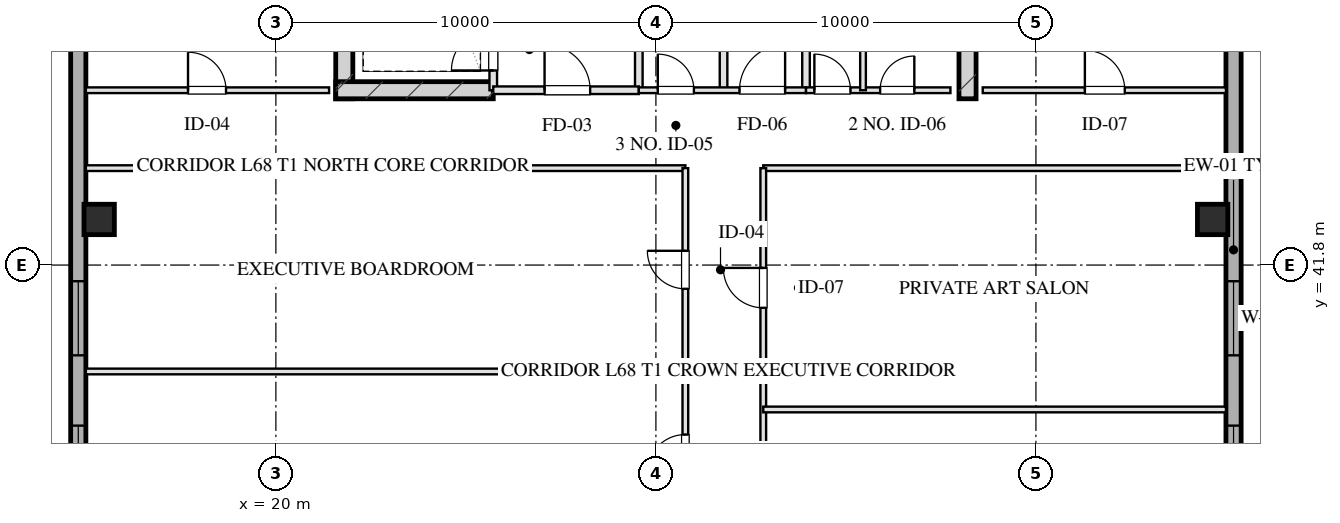
"""IFC4 building model, lengths in metres.
Left out: names, types, materials, properties, quantities, classifications, styles, units other than length and angle.
Written with IfcOpenShell. Run it as: python <this file> out.ifc"""

import sys

from ifc_helpers import new_model, si_unit, direction, frame, frame_2d, origin, origin_2d, place, context, subcontext, project, spatial, rectangle, hollow_rectangle, extrude, element, fill, save


model = new_model("IFC4")
c1 = context("Model", 3, precision=1e-05, world=origin(), true_north=direction((0.0, 1.0)))
c2 = subcontext(c1, "Body", "Model", "MODEL_VIEW")
j1 = project(units=[si_unit("LENGTHUNIT", "METRE"), si_unit("PLANEANGLEUNIT", "RADIAN")], contexts=[c1])
p1 = place(None, origin())
s1 = spatial("IfcSite", under=j1, at=p1, CompositionType="ELEMENT")
p2 = place(p1, origin())
s2 = spatial("IfcBuilding", under=s1, at=p2, CompositionType="ELEMENT")
p3 = place(p2, frame((0.0, 0.0, 250.4)))
s3 = spatial("IfcBuildingStorey", under=s2, at=p3, CompositionType="ELEMENT", Elevation=250.4)
for number, where, z_axis, x_axis in (
    (1, (21.8, 46.175, 0.0), (0.0, 0.0, 1.0), (0.0, 1.0, 0.0)),
    (2, (38.2, 46.175, 0.0), (0.0, 0.0, 1.0), (0.0, 1.0, 0.0)),
):
    element("IfcWall", number, at=place(p3, frame(where, z_axis=z_axis, x_axis=x_axis)), inside=s3, PredefinedType="SHEAR", context=c2, shape_type="SweptSolid", body=[
        extrude(rectangle(XDim=9.33, YDim=0.45, at=frame_2d((4.665, 0.0))), origin(), (0.0, 0.0, 1.0), 3.2),
    ])
p4 = place(p3, frame((21.575, 46.4, 0.0), z_axis=(0.0, 0.0, 1.0), x_axis=(1.0, 0.0, 0.0)))
e3 = element("IfcWall", 3, at=p4, inside=s3, PredefinedType="SHEAR", context=c2, shape_type="SweptSolid", body=[
    extrude(rectangle(XDim=4.145, YDim=0.45, at=frame_2d((2.073, 0.0))), origin(), (0.0, 0.0, 1.0), 3.2),
])
for number, where, z_axis, x_axis in (
    (4, (15.35, 43.0, 0.0), (0.0, 0.0, 1.0), (1.0, 0.0, 0.0)),
    (5, (44.65, 43.0, 0.0), (0.0, 0.0, 1.0), (1.0, 0.0, 0.0)),
):
    element("IfcColumn", number, at=place(p3, frame(where, z_axis=z_axis, x_axis=x_axis)), inside=s3, PredefinedType="COLUMN", context=c2, shape_type="SweptSolid", body=[
        extrude(hollow_rectangle(XDim=0.8, YDim=0.8, WallThickness=0.028, at=origin_2d()), origin(), (0.0, 0.0, 1.0), 3.201),
    ])
p5 = place(p3, frame((14.8, 13.1, 0.0), z_axis=(0.0, 0.0, 1.0), x_axis=(0.0, 1.0, 0.0)))
e6 = element("IfcWall", 6, at=p5, inside=s3, PredefinedType="SOLIDWALL", context=c2, shape_type="SweptSolid", body=[
    extrude(rectangle(XDim=41.8, YDim=0.4, at=frame_2d((20.9, 0.0))), origin(), (0.0, 0.0, 1.0), 2.36),
])
p6 = place(p5, frame((22.525, 0.0, 0.75)))
e7 = element("IfcOpeningElement", 7, at=p6, cuts=e6, PredefinedType="OPENING", context=c2, shape_type="SweptSolid", body=[
    extrude(rectangle(XDim=1.95, YDim=1.21, at=frame_2d((0.975, 0.605))), frame((0.0, 0.21, 0.0), z_axis=(0.0, -1.0, 0.0), x_axis=(1.0, 0.0, 0.0)), (0.0, 0.0, 1.0), 0.42),
])
p7 = place(p5, frame((26.325, 0.0, 0.75)))
e8 = element("IfcOpeningElement", 8, at=p7, cuts=e6, PredefinedType="OPENING", context=c2, shape_type="SweptSolid", body=[
    extrude(rectangle(XDim=1.95, YDim=1.21, at=frame_2d((0.975, 0.605))), frame((0.0, 0.21, 0.0), z_axis=(0.0, -1.0, 0.0), x_axis=(1.0, 0.0, 0.0)), (0.0, 0.0, 1.0), 0.42),
])
p8 = place(p5, frame((17.25, 0.0, 0.0)))
e9 = element("IfcOpeningElement", 9, at=p8, cuts=e6, PredefinedType="OPENING", context=c2, shape_type="SweptSolid", body=[
    extrude(rectangle(XDim=1.1, YDim=2.15, at=frame_2d((0.55, 1.075))), frame((0.0, 0.21, 0.0), z_axis=(0.0, -1.0, 0.0), x_axis=(1.0, 0.0, 0.0)), (0.0, 0.0, 1.0), 0.42),
])
p9 = place(p3, frame((45.2, 54.9, 0.0), z_axis=(0.0, 0.0, 1.0), x_axis=(0.0, -1.0, 0.0)))
e10 = element("IfcWall", 10, at=p9, inside=s3, PredefinedType="SOLIDWALL", context=c2, shape_type="SweptSolid", body=[
    extrude(rectangle(XDim=41.8, YDim=0.4, at=frame_2d((20.9, 0.0))), origin(), (0.0, 0.0, 1.0), 2.36),
])
p10 = place(p9, frame((17.325, 0.0, 0.75)))
e11 = element("IfcOpeningElement", 11, at=p10, cuts=e10, PredefinedType="OPENING", context=c2, shape_type="SweptSolid", body=[
    extrude(rectangle(XDim=1.95, YDim=1.21, at=frame_2d((0.975, 0.605))), frame((0.0, 0.21, 0.0), z_axis=(0.0, -1.0, 0.0), x_axis=(1.0, 0.0, 0.0)), (0.0, 0.0, 1.0), 0.42),
])
p11 = place(p9, frame((13.525, 0.0, 0.75)))
e12 = element("IfcOpeningElement", 12, at=p11, cuts=e10, PredefinedType="OPENING", context=c2, shape_type="SweptSolid", body=[
    extrude(rectangle(XDim=1.95, YDim=1.21, at=frame_2d((0.975, 0.605))), frame((0.0, 0.21, 0.0), z_axis=(0.0, -1.0, 0.0), x_axis=(1.0, 0.0, 0.0)), (0.0, 0.0, 1.0), 0.42),
])
p12 = place(p9, frame((26.15, 0.0, 0.0)))
e13 = element("IfcOpeningElement", 13, at=p12, cuts=e10, PredefinedType="OPENING", context=c2, shape_type="SweptSolid", body=[
    extrude(rectangle(XDim=1.1, YDim=2.15, at=frame_2d((0.55, 1.075))), frame((0.0, 0.21, 0.0), z_axis=(0.0, -1.0, 0.0), x_axis=(1.0, 0.0, 0.0)), (0.0, 0.0, 1.0), 0.42),
])
p13 = place(p3, frame((25.72, 46.4, 0.0), z_axis=(0.0, 0.0, 1.0), x_axis=(0.0, 1.0, 0.0)))
e14 = element("IfcWall", 14, at=p13, inside=s3, PredefinedType="PARTITIONING", context=c2, shape_type="SweptSolid", body=[
    extrude(rectangle(XDim=1.9, YDim=0.2, at=frame_2d((0.95, 0.0))), origin(), (0.0, 0.0, 1.0), 2.925),
])
p14 = place(p13, frame((0.52, 0.0, 0.0)))
e15 = element("IfcOpeningElement", 15, at=p14, cuts=e14, PredefinedType="OPENING", context=c2, shape_type="SweptSolid", body=[
    extrude(rectangle(XDim=1.1, YDim=2.05, at=frame_2d((0.55, 1.025))), frame((0.0, 0.11, 0.0), z_axis=(0.0, -1.0, 0.0), x_axis=(1.0, 0.0, 0.0)), (0.0, 0.0, 1.0), 0.22),
])
p15 = place(p3, frame((29.55, 46.4, 0.0), z_axis=(0.0, 0.0, 1.0), x_axis=(0.0, 1.0, 0.0)))
e16 = element("IfcWall", 16, at=p15, inside=s3, PredefinedType="PARTITIONING", context=c2, shape_type="SweptSolid", body=[
    extrude(rectangle(XDim=8.43, YDim=0.2, at=frame_2d((4.215, 0.0))), origin(), (0.0, 0.0, 1.0), 2.925),
])
p16 = place(p3, frame((25.72, 46.4, 0.0), z_axis=(0.0, 0.0, 1.0), x_axis=(1.0, 0.0, 0.0)))
e17 = element("IfcWall", 17, at=p16, inside=s3, PredefinedType="PARTITIONING", context=c2, shape_type="SweptSolid", body=[
    extrude(rectangle(XDim=3.83, YDim=0.2, at=frame_2d((1.915, 0.0))), origin(), (0.0, 0.0, 1.0), 2.925),
])
p17 = place(p16, frame((1.35, 0.0, 0.0)))
e18 = element("IfcOpeningElement", 18, at=p17, cuts=e17, PredefinedType="OPENING", context=c2, shape_type="SweptSolid", body=[
    extrude(rectangle(XDim=1.2, YDim=2.05, at=frame_2d((0.6, 1.025))), frame((0.0, 0.11, 0.0), z_axis=(0.0, -1.0, 0.0), x_axis=(1.0, 0.0, 0.0)), (0.0, 0.0, 1.0), 0.22),
])
for number, where, z_axis, x_axis in (
    (19, (33.95, 46.4, 0.0), (0.0, 0.0, 1.0), (0.0, 1.0, 0.0)),
    (20, (31.78, 46.4, 0.0), (0.0, 0.0, 1.0), (0.0, 1.0, 0.0)),
):
    element("IfcWall", number, at=place(p3, frame(where, z_axis=z_axis, x_axis=x_axis)), inside=s3, PredefinedType="PARTITIONING", context=c2, shape_type="SweptSolid", body=[
        extrude(rectangle(XDim=8.43, YDim=0.2, at=frame_2d((4.215, 0.0))), origin(), (0.0, 0.0, 1.0), 2.925),
    ])
p18 = place(p3, frame((29.55, 46.4, 0.0), z_axis=(0.0, 0.0, 1.0), x_axis=(1.0, 0.0, 0.0)))
e21 = element("IfcWall", 21, at=p18, inside=s3, PredefinedType="PARTITIONING", context=c2, shape_type="SweptSolid", body=[
    extrude(rectangle(XDim=4.4, YDim=0.15, at=frame_2d((2.2, 0.0))), origin(), (0.0, 0.0, 1.0), 2.925),
])
p19 = place(p18, frame((0.5, 0.0, 0.0)))
e22 = element("IfcOpeningElement", 22, at=p19, cuts=e21, PredefinedType="OPENING", context=c2, shape_type="SweptSolid", body=[
    extrude(rectangle(XDim=0.95, YDim=2.05, at=frame_2d((0.475, 1.025))), frame((0.0, 0.085, 0.0), z_axis=(0.0, -1.0, 0.0), x_axis=(1.0, 0.0, 0.0)), (0.0, 0.0, 1.0), 0.17),
])
p20 = place(p18, frame((2.65, 0.0, 0.0)))
e23 = element("IfcOpeningElement", 23, at=p20, cuts=e21, PredefinedType="OPENING", context=c2, shape_type="SweptSolid", body=[
    extrude(rectangle(XDim=1.2, YDim=2.05, at=frame_2d((0.6, 1.025))), frame((0.0, 0.085, 0.0), z_axis=(0.0, -1.0, 0.0), x_axis=(1.0, 0.0, 0.0)), (0.0, 0.0, 1.0), 0.17),
])
p21 = place(p3, frame((33.95, 46.4, 0.0), z_axis=(0.0, 0.0, 1.0), x_axis=(1.0, 0.0, 0.0)))
e24 = element("IfcWall", 24, at=p21, inside=s3, PredefinedType="PARTITIONING", context=c2, shape_type="SweptSolid", body=[
    extrude(rectangle(XDim=3.8, YDim=0.15, at=frame_2d((1.9, 0.0))), origin(), (0.0, 0.0, 1.0), 2.925),
])
p22 = place(p21, frame((0.22, 0.0, 0.0)))
e25 = element("IfcOpeningElement", 25, at=p22, cuts=e24, PredefinedType="OPENING", context=c2, shape_type="SweptSolid", body=[
    extrude(rectangle(XDim=0.95, YDim=2.05, at=frame_2d((0.475, 1.025))), frame((0.0, 0.085, 0.0), z_axis=(0.0, -1.0, 0.0), x_axis=(1.0, 0.0, 0.0)), (0.0, 0.0, 1.0), 0.17),
])
p23 = place(p21, frame((1.95, 0.0, 0.0)))
e26 = element("IfcOpeningElement", 26, at=p23, cuts=e24, PredefinedType="OPENING", context=c2, shape_type="SweptSolid", body=[
    extrude(rectangle(XDim=0.9, YDim=2.05, at=frame_2d((0.45, 1.025))), frame((0.0, 0.085, 0.0), z_axis=(0.0, -1.0, 0.0), x_axis=(1.0, 0.0, 0.0)), (0.0, 0.0, 1.0), 0.17),
])
p24 = place(p3, frame((35.45, 46.4, 0.0), z_axis=(0.0, 0.0, 1.0), x_axis=(0.0, 1.0, 0.0)))
e27 = element("IfcWall", 27, at=p24, inside=s3, PredefinedType="PARTITIONING", context=c2, shape_type="SweptSolid", body=[
    extrude(rectangle(XDim=8.43, YDim=0.15, at=frame_2d((4.215, 0.0))), origin(), (0.0, 0.0, 1.0), 2.515),
])
p25 = place(p24, frame((2.55, 0.0, 0.0)))
e28 = element("IfcOpeningElement", 28, at=p25, cuts=e27, PredefinedType="OPENING", context=c2, shape_type="SweptSolid", body=[
    extrude(rectangle(XDim=0.95, YDim=2.05, at=frame_2d((0.475, 1.025))), frame((0.0, 0.085, 0.0), z_axis=(0.0, -1.0, 0.0), x_axis=(1.0, 0.0, 0.0)), (0.0, 0.0, 1.0), 0.17),
])
p26 = place(p24, frame((5.6, 0.0, 0.0)))
e29 = element("IfcOpeningElement", 29, at=p26, cuts=e27, PredefinedType="OPENING", context=c2, shape_type="SweptSolid", body=[
    extrude(rectangle(XDim=0.9, YDim=2.05, at=frame_2d((0.45, 1.025))), frame((0.0, 0.085, 0.0), z_axis=(0.0, -1.0, 0.0), x_axis=(1.0, 0.0, 0.0)), (0.0, 0.0, 1.0), 0.17),
])
p27 = place(p3, frame((15.0, 46.4, 0.0), z_axis=(0.0, 0.0, 1.0), x_axis=(1.0, 0.0, 0.0)))
e30 = element("IfcWall", 30, at=p27, inside=s3, PredefinedType="PARTITIONING", context=c2, shape_type="SweptSolid", body=[
    extrude(rectangle(XDim=6.4, YDim=0.15, at=frame_2d((3.2, 0.0))), origin(), (0.0, 0.0, 1.0), 2.925),
])
p28 = place(p27, frame((2.688, 0.0, 0.0)))
e31 = element("IfcOpeningElement", 31, at=p28, cuts=e30, PredefinedType="OPENING", context=c2, shape_type="SweptSolid", body=[
    extrude(rectangle(XDim=1.0, YDim=2.05, at=frame_2d((0.5, 1.025))), frame((0.0, 0.085, 0.0), z_axis=(0.0, -1.0, 0.0), x_axis=(1.0, 0.0, 0.0)), (0.0, 0.0, 1.0), 0.17),
])
p29 = place(p3, frame((38.6, 46.4, 0.0), z_axis=(0.0, 0.0, 1.0), x_axis=(1.0, 0.0, 0.0)))
e32 = element("IfcWall", 32, at=p29, inside=s3, PredefinedType="PARTITIONING", context=c2, shape_type="SweptSolid", body=[
    extrude(rectangle(XDim=6.4, YDim=0.15, at=frame_2d((3.2, 0.0))), origin(), (0.0, 0.0, 1.0), 2.925),
])
p30 = place(p29, frame((2.688, 0.0, 0.0)))
e33 = element("IfcOpeningElement", 33, at=p30, cuts=e32, PredefinedType="OPENING", context=c2, shape_type="SweptSolid", body=[
    extrude(rectangle(XDim=1.05, YDim=2.05, at=frame_2d((0.525, 1.025))), frame((0.0, 0.085, 0.0), z_axis=(0.0, -1.0, 0.0), x_axis=(1.0, 0.0, 0.0)), (0.0, 0.0, 1.0), 0.17),
])
p31 = place(p3, frame((15.0, 44.35, 0.0), z_axis=(0.0, 0.0, 1.0), x_axis=(1.0, 0.0, 0.0)))
e34 = element("IfcWall", 34, at=p31, inside=s3, PredefinedType="PARTITIONING", context=c2, shape_type="SweptSolid", body=[
    extrude(rectangle(XDim=15.775, YDim=0.15, at=frame_2d((7.887, 0.0))), origin(), (0.0, 0.0, 1.0), 2.925),
])
p32 = place(p3, frame((32.825, 44.35, 0.0), z_axis=(0.0, 0.0, 1.0), x_axis=(1.0, 0.0, 0.0)))
e35 = element("IfcWall", 35, at=p32, inside=s3, PredefinedType="PARTITIONING", context=c2, shape_type="SweptSolid", body=[
    extrude(rectangle(XDim=12.175, YDim=0.15, at=frame_2d((6.087, 0.0))), origin(), (0.0, 0.0, 1.0), 2.925),
])
p33 = place(p3, frame((30.775, 23.65, 0.0), z_axis=(0.0, 0.0, 1.0), x_axis=(0.0, 1.0, 0.0)))
e36 = element("IfcWall", 36, at=p33, inside=s3, PredefinedType="PARTITIONING", context=c2, shape_type="SweptSolid", body=[
    extrude(rectangle(XDim=20.7, YDim=0.15, at=frame_2d((10.35, 0.0))), origin(), (0.0, 0.0, 1.0), 2.925),
])
p34 = place(p33, frame((2.175, 0.0, 0.0)))
e37 = element("IfcOpeningElement", 37, at=p34, cuts=e36, PredefinedType="OPENING", context=c2, shape_type="SweptSolid", body=[
    extrude(rectangle(XDim=1.0, YDim=2.05, at=frame_2d((0.5, 1.025))), frame((0.0, 0.085, 0.0), z_axis=(0.0, -1.0, 0.0), x_axis=(1.0, 0.0, 0.0)), (0.0, 0.0, 1.0), 0.17),
])
p35 = place(p33, frame((7.69, 0.0, 0.0)))
e38 = element("IfcOpeningElement", 38, at=p35, cuts=e36, PredefinedType="OPENING", context=c2, shape_type="SweptSolid", body=[
    extrude(rectangle(XDim=1.0, YDim=2.05, at=frame_2d((0.5, 1.025))), frame((0.0, 0.085, 0.0), z_axis=(0.0, -1.0, 0.0), x_axis=(1.0, 0.0, 0.0)), (0.0, 0.0, 1.0), 0.17),
])
p36 = place(p33, frame((12.69, 0.0, 0.0)))
e39 = element("IfcOpeningElement", 39, at=p36, cuts=e36, PredefinedType="OPENING", context=c2, shape_type="SweptSolid", body=[
    extrude(rectangle(XDim=1.0, YDim=2.05, at=frame_2d((0.5, 1.025))), frame((0.0, 0.085, 0.0), z_axis=(0.0, -1.0, 0.0), x_axis=(1.0, 0.0, 0.0)), (0.0, 0.0, 1.0), 0.17),
])
p37 = place(p33, frame((17.525, 0.0, 0.0)))
e40 = element("IfcOpeningElement", 40, at=p37, cuts=e36, PredefinedType="OPENING", context=c2, shape_type="SweptSolid", body=[
    extrude(rectangle(XDim=1.0, YDim=2.05, at=frame_2d((0.5, 1.025))), frame((0.0, 0.085, 0.0), z_axis=(0.0, -1.0, 0.0), x_axis=(1.0, 0.0, 0.0)), (0.0, 0.0, 1.0), 0.17),
])
p38 = place(p3, frame((32.825, 23.65, 0.0), z_axis=(0.0, 0.0, 1.0), x_axis=(0.0, 1.0, 0.0)))
e41 = element("IfcWall", 41, at=p38, inside=s3, PredefinedType="PARTITIONING", context=c2, shape_type="SweptSolid", body=[
    extrude(rectangle(XDim=20.7, YDim=0.15, at=frame_2d((10.35, 0.0))), origin(), (0.0, 0.0, 1.0), 2.925),
])
p39 = place(p38, frame((2.675, 0.0, 0.0)))
e42 = element("IfcOpeningElement", 42, at=p39, cuts=e41, PredefinedType="OPENING", context=c2, shape_type="SweptSolid", body=[
    extrude(rectangle(XDim=1.0, YDim=2.05, at=frame_2d((0.5, 1.025))), frame((0.0, 0.085, 0.0), z_axis=(0.0, -1.0, 0.0), x_axis=(1.0, 0.0, 0.0)), (0.0, 0.0, 1.0), 0.17),
])
p40 = place(p38, frame((9.85, 0.0, 0.0)))
e43 = element("IfcOpeningElement", 43, at=p40, cuts=e41, PredefinedType="OPENING", context=c2, shape_type="SweptSolid", body=[
    extrude(rectangle(XDim=0.85, YDim=2.05, at=frame_2d((0.425, 1.025))), frame((0.0, 0.085, 0.0), z_axis=(0.0, -1.0, 0.0), x_axis=(1.0, 0.0, 0.0)), (0.0, 0.0, 1.0), 0.17),
])
p41 = place(p38, frame((17.025, 0.0, 0.0)))
e44 = element("IfcOpeningElement", 44, at=p41, cuts=e41, PredefinedType="OPENING", context=c2, shape_type="SweptSolid", body=[
    extrude(rectangle(XDim=1.05, YDim=2.05, at=frame_2d((0.525, 1.025))), frame((0.0, 0.085, 0.0), z_axis=(0.0, -1.0, 0.0), x_axis=(1.0, 0.0, 0.0)), (0.0, 0.0, 1.0), 0.17),
])
p42 = place(p3, frame((15.0, 39.0, 0.0), z_axis=(0.0, 0.0, 1.0), x_axis=(1.0, 0.0, 0.0)))
e45 = element("IfcWall", 45, at=p42, inside=s3, PredefinedType="PARTITIONING", context=c2, shape_type="SweptSolid", body=[
    extrude(rectangle(XDim=15.775, YDim=0.15, at=frame_2d((7.887, 0.0))), origin(), (0.0, 0.0, 1.0), 2.925),
])
p43 = place(p3, frame((32.825, 38.0, 0.0), z_axis=(0.0, 0.0, 1.0), x_axis=(1.0, 0.0, 0.0)))
e46 = element("IfcWall", 46, at=p43, inside=s3, PredefinedType="PARTITIONING", context=c2, shape_type="SweptSolid", body=[
    extrude(rectangle(XDim=12.175, YDim=0.15, at=frame_2d((6.087, 0.0))), origin(), (0.0, 0.0, 1.0), 2.925),
])
p44 = place(p6, origin())
e47 = element("IfcWindow", 47, at=p44, inside=s3, PartitioningType="TRIPLE_PANEL_VERTICAL", PredefinedType="WINDOW", context=c2, shape_type="SweptSolid", body=[
    extrude(rectangle(XDim=1.95, YDim=1.21, at=frame_2d((0.975, 0.605))), frame((0.0, 0.03, 0.0), z_axis=(0.0, -1.0, 0.0), x_axis=(1.0, 0.0, 0.0)), (0.0, 0.0, 1.0), 0.06),
])
fill(e7, e47)
p45 = place(p7, origin())
e48 = element("IfcWindow", 48, at=p45, inside=s3, PartitioningType="TRIPLE_PANEL_VERTICAL", PredefinedType="WINDOW", context=c2, shape_type="SweptSolid", body=[
    extrude(rectangle(XDim=1.95, YDim=1.21, at=frame_2d((0.975, 0.605))), frame((0.0, 0.03, 0.0), z_axis=(0.0, -1.0, 0.0), x_axis=(1.0, 0.0, 0.0)), (0.0, 0.0, 1.0), 0.06),
])
fill(e8, e48)
p46 = place(p10, origin())
e49 = element("IfcWindow", 49, at=p46, inside=s3, PartitioningType="TRIPLE_PANEL_VERTICAL", PredefinedType="WINDOW", context=c2, shape_type="SweptSolid", body=[
    extrude(rectangle(XDim=1.95, YDim=1.21, at=frame_2d((0.975, 0.605))), frame((0.0, 0.03, 0.0), z_axis=(0.0, -1.0, 0.0), x_axis=(1.0, 0.0, 0.0)), (0.0, 0.0, 1.0), 0.06),
])
fill(e11, e49)
p47 = place(p11, origin())
e50 = element("IfcWindow", 50, at=p47, inside=s3, PartitioningType="TRIPLE_PANEL_VERTICAL", PredefinedType="WINDOW", context=c2, shape_type="SweptSolid", body=[
    extrude(rectangle(XDim=1.95, YDim=1.21, at=frame_2d((0.975, 0.605))), frame((0.0, 0.03, 0.0), z_axis=(0.0, -1.0, 0.0), x_axis=(1.0, 0.0, 0.0)), (0.0, 0.0, 1.0), 0.06),
])
fill(e12, e50)
p48 = place(p14, origin())
e51 = element("IfcDoor", 51, at=p48, inside=s3, OperationType="SINGLE_SWING_LEFT", PredefinedType="DOOR", context=c2, shape_type="SweptSolid", body=[
    extrude(rectangle(XDim=1.1, YDim=2.05, at=frame_2d((0.55, 1.025))), frame((0.0, 0.025, 0.0), z_axis=(0.0, -1.0, 0.0), x_axis=(1.0, 0.0, 0.0)), (0.0, 0.0, 1.0), 0.05),
])
fill(e15, e51)
p49 = place(p17, origin())
e52 = element("IfcDoor", 52, at=p49, inside=s3, OperationType="SINGLE_SWING_LEFT", PredefinedType="DOOR", context=c2, shape_type="SweptSolid", body=[
    extrude(rectangle(XDim=1.2, YDim=2.05, at=frame_2d((0.6, 1.025))), frame((0.0, 0.025, 0.0), z_axis=(0.0, -1.0, 0.0), x_axis=(1.0, 0.0, 0.0)), (0.0, 0.0, 1.0), 0.05),
])
fill(e18, e52)
p50 = place(p19, origin())
e53 = element("IfcDoor", 53, at=p50, inside=s3, OperationType="SINGLE_SWING_LEFT", PredefinedType="DOOR", context=c2, shape_type="SweptSolid", body=[
    extrude(rectangle(XDim=0.95, YDim=2.05, at=frame_2d((0.475, 1.025))), frame((0.0, 0.025, 0.0), z_axis=(0.0, -1.0, 0.0), x_axis=(1.0, 0.0, 0.0)), (0.0, 0.0, 1.0), 0.05),
])
fill(e22, e53)
p51 = place(p20, origin())
e54 = element("IfcDoor", 54, at=p51, inside=s3, OperationType="SINGLE_SWING_RIGHT", PredefinedType="DOOR", context=c2, shape_type="SweptSolid", body=[
    extrude(rectangle(XDim=1.2, YDim=2.05, at=frame_2d((0.6, 1.025))), frame((0.0, 0.025, 0.0), z_axis=(0.0, -1.0, 0.0), x_axis=(1.0, 0.0, 0.0)), (0.0, 0.0, 1.0), 0.05),
])
fill(e23, e54)
p52 = place(p22, origin())
e55 = element("IfcDoor", 55, at=p52, inside=s3, OperationType="SINGLE_SWING_LEFT", PredefinedType="DOOR", context=c2, shape_type="SweptSolid", body=[
    extrude(rectangle(XDim=0.95, YDim=2.05, at=frame_2d((0.475, 1.025))), frame((0.0, 0.025, 0.0), z_axis=(0.0, -1.0, 0.0), x_axis=(1.0, 0.0, 0.0)), (0.0, 0.0, 1.0), 0.05),
])
fill(e25, e55)
p53 = place(p23, origin())
e56 = element("IfcDoor", 56, at=p53, inside=s3, OperationType="SINGLE_SWING_RIGHT", PredefinedType="DOOR", context=c2, shape_type="SweptSolid", body=[
    extrude(rectangle(XDim=0.9, YDim=2.05, at=frame_2d((0.45, 1.025))), frame((0.0, 0.025, 0.0), z_axis=(0.0, -1.0, 0.0), x_axis=(1.0, 0.0, 0.0)), (0.0, 0.0, 1.0), 0.05),
])
fill(e26, e56)
p54 = place(p28, origin())
e57 = element("IfcDoor", 57, at=p54, inside=s3, OperationType="SINGLE_SWING_LEFT", PredefinedType="DOOR", context=c2, shape_type="SweptSolid", body=[
    extrude(rectangle(XDim=1.0, YDim=2.05, at=frame_2d((0.5, 1.025))), frame((0.0, 0.025, 0.0), z_axis=(0.0, -1.0, 0.0), x_axis=(1.0, 0.0, 0.0)), (0.0, 0.0, 1.0), 0.05),
])
fill(e31, e57)
p55 = place(p30, origin())
e58 = element("IfcDoor", 58, at=p55, inside=s3, OperationType="SINGLE_SWING_LEFT", PredefinedType="DOOR", context=c2, shape_type="SweptSolid", body=[
    extrude(rectangle(XDim=1.05, YDim=2.05, at=frame_2d((0.525, 1.025))), frame((0.0, 0.025, 0.0), z_axis=(0.0, -1.0, 0.0), x_axis=(1.0, 0.0, 0.0)), (0.0, 0.0, 1.0), 0.05),
])
fill(e33, e58)
p56 = place(p36, origin())
e59 = element("IfcDoor", 59, at=p56, inside=s3, OperationType="SINGLE_SWING_LEFT", PredefinedType="DOOR", context=c2, shape_type="SweptSolid", body=[
    extrude(rectangle(XDim=1.0, YDim=2.05, at=frame_2d((0.5, 1.025))), frame((0.0, 0.025, 0.0), z_axis=(0.0, -1.0, 0.0), x_axis=(1.0, 0.0, 0.0)), (0.0, 0.0, 1.0), 0.05),
])
fill(e39, e59)
p57 = place(p37, origin())
e60 = element("IfcDoor", 60, at=p57, inside=s3, OperationType="SINGLE_SWING_RIGHT", PredefinedType="DOOR", context=c2, shape_type="SweptSolid", body=[
    extrude(rectangle(XDim=1.0, YDim=2.05, at=frame_2d((0.5, 1.025))), frame((0.0, 0.025, 0.0), z_axis=(0.0, -1.0, 0.0), x_axis=(1.0, 0.0, 0.0)), (0.0, 0.0, 1.0), 0.05),
])
fill(e40, e60)
p58 = place(p41, origin())
e61 = element("IfcDoor", 61, at=p58, inside=s3, OperationType="SINGLE_SWING_RIGHT", PredefinedType="DOOR", context=c2, shape_type="SweptSolid", body=[
    extrude(rectangle(XDim=1.05, YDim=2.05, at=frame_2d((0.525, 1.025))), frame((0.0, 0.025, 0.0), z_axis=(0.0, -1.0, 0.0), x_axis=(1.0, 0.0, 0.0)), (0.0, 0.0, 1.0), 0.05),
])
fill(e44, e61)
save(model, sys.argv[1])
